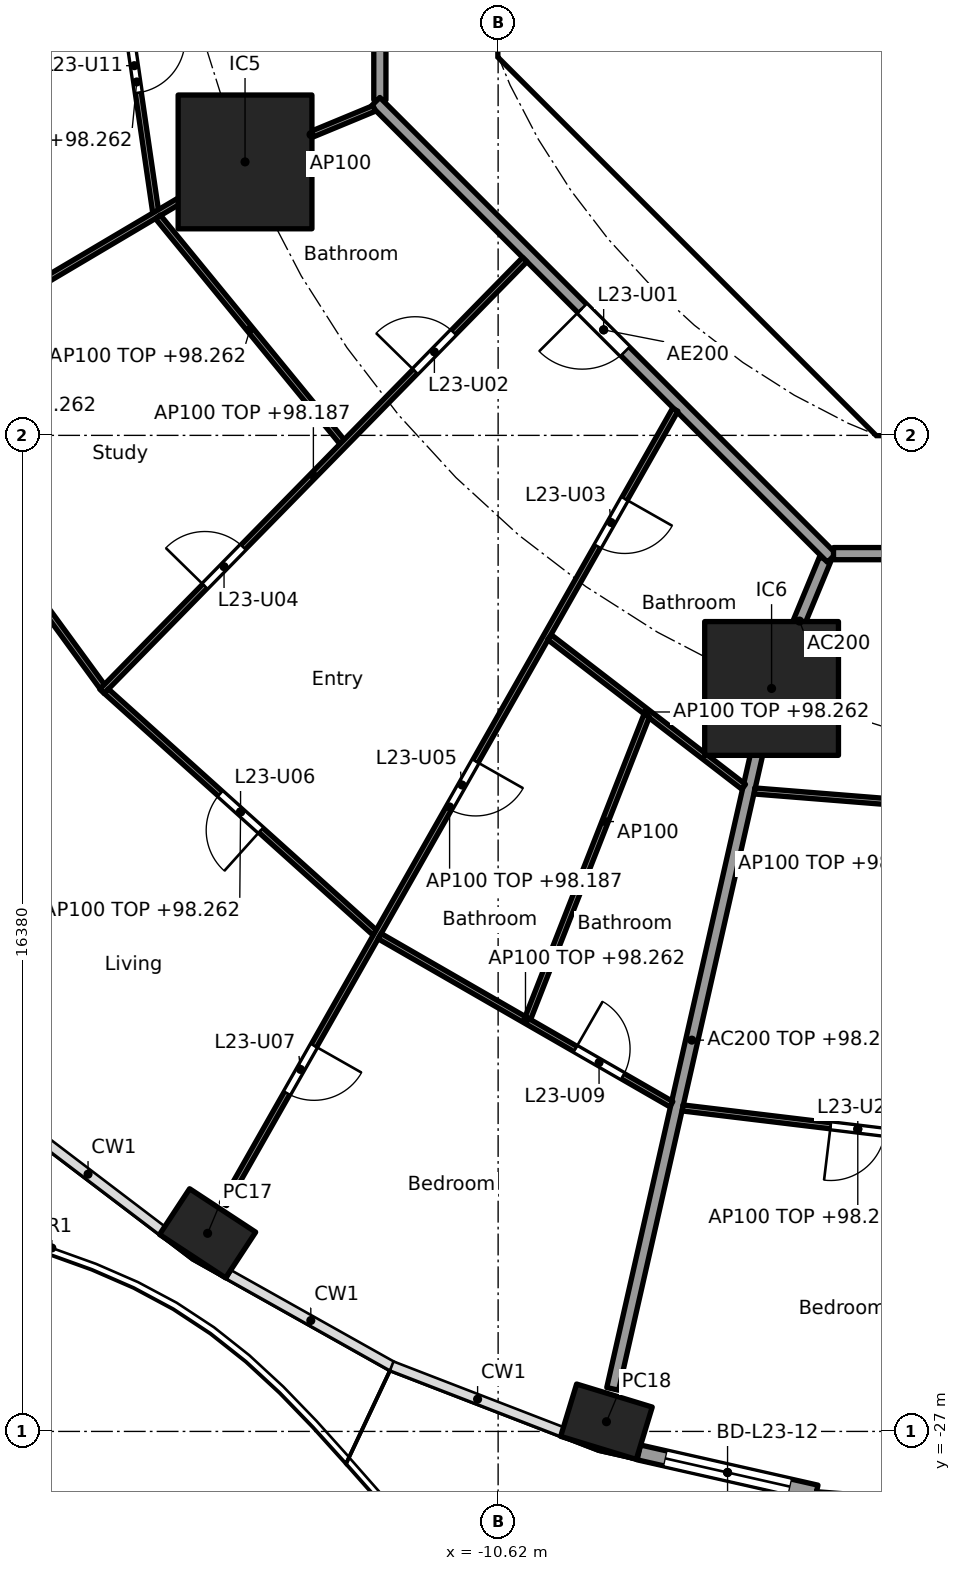
"""IFC4 building model, lengths in metres.
Left out: names, types, materials, properties, quantities, classifications, styles, units other than length and angle.
Written with IfcOpenShell. Run it as: python <this file> out.ifc"""

import sys

from ifc_helpers import new_model, si_unit, direction, frame, frame_2d, origin, origin_2d, place, context, subcontext, project, spatial, polyline, rectangle, hollow_rectangle, outline, extrude, element, fill, save


model = new_model("IFC4")
c1 = context("Model", 3, precision=1e-05, world=origin(), true_north=direction((0.0, 1.0)))
c2 = subcontext(c1, "Body", "Model", "MODEL_VIEW")
j1 = project(units=[si_unit("LENGTHUNIT", "METRE"), si_unit("PLANEANGLEUNIT", "RADIAN")], contexts=[c1])
p1 = place(None, origin())
s1 = spatial("IfcSite", under=j1, at=p1, CompositionType="ELEMENT")
p2 = place(p1, origin())
s2 = spatial("IfcBuilding", under=s1, at=p2, CompositionType="ELEMENT")
p3 = place(p2, frame((0.0, 0.0, 95.5)))
s3 = spatial("IfcBuildingStorey", under=s2, at=p3, CompositionType="ELEMENT", Elevation=95.5)
for number, where, z_axis, x_axis in (
    (1, (-15.397, -23.742, 0.0), (0.0, 0.0, 1.0), (0.836, -0.549, 0.0)),
    (2, (-8.839, -26.841, 0.0), (0.0, 0.0, 1.0), (0.957, -0.292, 0.0)),
):
    element("IfcColumn", number, at=place(p3, frame(where, z_axis=z_axis, x_axis=x_axis)), inside=s3, PredefinedType="COLUMN", context=c2, shape_type="SweptSolid", body=[
        extrude(hollow_rectangle(XDim=1.3, YDim=0.9, WallThickness=0.045, at=origin_2d()), origin(), (0.0, 0.0, 1.0), 3.7),
    ])
for number, where, z_axis, x_axis in (
    (3, (-14.782, -6.123, 0.0), (0.0, 0.0, 1.0), (1.0, 0.0, 0.0)),
    (4, (-6.123, -14.782, 0.0), (0.0, 0.0, 1.0), (1.0, 0.0, 0.0)),
):
    element("IfcColumn", number, at=place(p3, frame(where, z_axis=z_axis, x_axis=x_axis)), inside=s3, PredefinedType="COLUMN", context=c2, shape_type="SweptSolid", body=[
        extrude(rectangle(XDim=2.2, YDim=2.2, at=origin_2d()), origin(), (0.0, 0.0, 1.0), 3.7),
    ])
p4 = place(p3, frame((-5.387, -28.006, 0.0), z_axis=(0.0, 0.0, 1.0), x_axis=(-0.975317607872, 0.220806620767, 0.0)))
e5 = element("IfcWall", 5, at=p4, inside=s3, PredefinedType="SOLIDWALL", context=c2, shape_type="SweptSolid", body=[
    extrude(rectangle(XDim=2.993, YDim=0.25, at=frame_2d((1.497, 0.0))), origin(), (0.0, 0.0, 1.0), 3.44),
])
p5 = place(p4, frame((0.447, 0.0, 0.0)))
e6 = element("IfcOpeningElement", 6, at=p5, cuts=e5, PredefinedType="OPENING", context=c2, shape_type="SweptSolid", body=[
    extrude(rectangle(XDim=2.1, YDim=2.4, at=frame_2d((1.05, 1.2))), frame((0.0, 0.135, 0.0), z_axis=(0.0, -1.0, 0.0), x_axis=(1.0, 0.0, 0.0)), (0.0, 0.0, 1.0), 0.27),
])
p6 = place(p3, frame((-9.988, -4.613, 0.0), z_axis=(0.0, 0.0, 1.0), x_axis=(0.707106781187, -0.707106781187, 0.0)))
e7 = element("IfcWall", 7, at=p6, inside=s3, PredefinedType="SHEAR", context=c2, shape_type="SweptSolid", body=[
    extrude(rectangle(XDim=7.602, YDim=0.6, at=frame_2d((3.801, 0.0))), origin(), (0.0, 0.0, 1.0), 3.44),
])
p7 = place(p6, frame((6.151, 0.0, 0.0)))
e8 = element("IfcOpeningElement", 8, at=p7, cuts=e7, PredefinedType="OPENING", context=c2, shape_type="SweptSolid", body=[
    extrude(rectangle(XDim=1.1, YDim=2.1, at=frame_2d((0.55, 1.05))), frame((0.0, 0.31, 0.0), z_axis=(0.0, -1.0, 0.0), x_axis=(1.0, 0.0, 0.0)), (0.0, 0.0, 1.0), 0.62),
])
p8 = place(p3, frame((-7.4, -6.627, 0.0), z_axis=(0.0, 0.0, 1.0), x_axis=(0.0, 1.0, 0.0)))
e9 = element("IfcWall", 9, at=p8, inside=s3, PredefinedType="PARTITIONING", context=c2, shape_type="SweptSolid", body=[
    extrude(rectangle(XDim=2.527, YDim=0.15, at=frame_2d((1.263, 0.0))), origin(), (0.0, 0.0, 1.0), 3.44),
])
p9 = place(p8, frame((0.776, 0.0, 0.0)))
e10 = element("IfcOpeningElement", 10, at=p9, cuts=e9, PredefinedType="OPENING", context=c2, shape_type="SweptSolid", body=[
    extrude(rectangle(XDim=0.9, YDim=2.1, at=frame_2d((0.45, 1.05))), frame((0.0, 0.085, 0.0), z_axis=(0.0, -1.0, 0.0), x_axis=(1.0, 0.0, 0.0)), (0.0, 0.0, 1.0), 0.17),
])
p10 = place(p3, origin())
e11 = element("IfcWall", 11, at=p10, inside=s3, PredefinedType="SHEAR", context=c2, shape_type="SweptSolid", body=[
    extrude(outline(polyline([(-10.625, -3.801), (-10.025, -3.801), (-10.025, -4.152), (-9.776, -4.401), (-10.2, -4.825), (-10.625, -4.401), (-10.625, -3.801)])), origin(), (0.0, 0.0, 1.0), 3.44),
])
p11 = place(p3, origin())
e12 = element("IfcWall", 12, at=p11, inside=s3, PredefinedType="SHEAR", context=c2, shape_type="SweptSolid", body=[
    extrude(outline(polyline([(-4.152, -10.025), (4.152, -10.025), (4.401, -9.776), (4.825, -10.2), (4.401, -10.625), (-4.401, -10.625), (-4.825, -10.2), (-4.401, -9.776), (-4.152, -10.025)])), origin(), (0.0, 0.0, 1.0), 3.44),
])
p12 = place(p3, frame((-5.243, -12.657, 0.0), z_axis=(0.0, 0.0, 1.0), x_axis=(-0.382668627144, -0.923885664896, 0.0)))
e13 = element("IfcWall", 13, at=p12, inside=s3, PredefinedType="PARTITIONING", context=c2, shape_type="SweptSolid", body=[
    extrude(rectangle(XDim=2.2, YDim=0.2, at=frame_2d((1.1, 0.0))), origin(), (0.0, 0.0, 1.0), 3.44),
])
p13 = place(p3, frame((-6.134, -14.831, 0.0), z_axis=(0.0, 0.0, 1.0), x_axis=(-0.221225405869, -0.975222702667, 0.0)))
e14 = element("IfcWall", 14, at=p13, inside=s3, PredefinedType="PARTITIONING", context=c2, shape_type="SweptSolid", body=[
    extrude(rectangle(XDim=11.761, YDim=0.2, at=frame_2d((5.88, 0.0))), origin(), (0.0, 0.0, 1.0), 2.762),
])
p14 = place(p3, frame((-12.565, 5.304, 0.0), z_axis=(0.0, 0.0, 1.0), x_axis=(0.0, -1.0, 0.0)))
e15 = element("IfcWall", 15, at=p14, inside=s3, PredefinedType="PARTITIONING", context=c2, shape_type="SweptSolid", body=[
    extrude(rectangle(XDim=10.409, YDim=0.2, at=frame_2d((5.205, 0.0))), origin(), (0.0, 0.0, 1.0), 3.44),
])
p15 = place(p3, frame((-12.635, -5.134, 0.0), z_axis=(0.0, 0.0, 1.0), x_axis=(0.707106781187, -0.707106781187, 0.0)))
e16 = element("IfcWall", 16, at=p15, inside=s3, PredefinedType="PARTITIONING", context=c2, shape_type="SweptSolid", body=[
    extrude(rectangle(XDim=10.609, YDim=0.2, at=frame_2d((5.305, 0.0))), origin(), (0.0, 0.0, 1.0), 3.44),
])
p16 = place(p15, frame((4.804, 0.0, 0.0)))
e17 = element("IfcOpeningElement", 17, at=p16, cuts=e16, PredefinedType="OPENING", context=c2, shape_type="SweptSolid", body=[
    extrude(rectangle(XDim=1.0, YDim=2.1, at=frame_2d((0.5, 1.05))), frame((0.0, 0.11, 0.0), z_axis=(0.0, -1.0, 0.0), x_axis=(1.0, 0.0, 0.0)), (0.0, 0.0, 1.0), 0.22),
])
p17 = place(p3, frame((-5.104, -12.565, 0.0), z_axis=(0.0, 0.0, 1.0), x_axis=(1.0, 0.0, 0.0)))
e18 = element("IfcWall", 18, at=p17, inside=s3, PredefinedType="PARTITIONING", context=c2, shape_type="SweptSolid", body=[
    extrude(rectangle(XDim=10.409, YDim=0.2, at=frame_2d((5.205, 0.0))), origin(), (0.0, 0.0, 1.0), 3.44),
])
p18 = place(p3, frame((-16.874, -2.677, 0.0), z_axis=(0.0, 0.0, 1.0), x_axis=(0.144260658133, -0.989539722555, 0.0)))
e19 = element("IfcWall", 19, at=p18, inside=s3, PredefinedType="PARTITIONING", context=c2, shape_type="SweptSolid", body=[
    extrude(rectangle(XDim=4.309, YDim=0.1, at=frame_2d((2.154, 0.0))), origin(), (0.0, 0.0, 1.0), 2.762),
])
p19 = place(p18, frame((1.434, 0.0, 0.0)))
e20 = element("IfcOpeningElement", 20, at=p19, cuts=e19, PredefinedType="OPENING", context=c2, shape_type="SweptSolid", body=[
    extrude(rectangle(XDim=0.9, YDim=2.1, at=frame_2d((0.45, 1.05))), frame((0.0, 0.06, 0.0), z_axis=(0.0, -1.0, 0.0), x_axis=(1.0, 0.0, 0.0)), (0.0, 0.0, 1.0), 0.12),
])
p20 = place(p3, frame((-12.657, -5.243, 0.0), z_axis=(0.0, 0.0, 1.0), x_axis=(-0.923848837015, -0.382757529444, 0.0)))
e21 = element("IfcWall", 21, at=p20, inside=s3, PredefinedType="PARTITIONING", context=c2, shape_type="SweptSolid", body=[
    extrude(rectangle(XDim=2.25, YDim=0.1, at=frame_2d((1.125, 0.0))), origin(), (0.0, 0.0, 1.0), 3.44),
])
p21 = place(p3, frame((-14.825, -6.148, 0.0), z_axis=(0.0, 0.0, 1.0), x_axis=(-0.860400431487, -0.509618580408, 0.0)))
e22 = element("IfcWall", 22, at=p21, inside=s3, PredefinedType="PARTITIONING", context=c2, shape_type="SweptSolid", body=[
    extrude(rectangle(XDim=11.688, YDim=0.1, at=frame_2d((5.844, 0.0))), origin(), (0.0, 0.0, 1.0), 2.762),
])
p22 = place(p21, frame((3.858, 0.0, 0.0)))
e23 = element("IfcOpeningElement", 23, at=p22, cuts=e22, PredefinedType="OPENING", context=c2, shape_type="SweptSolid", body=[
    extrude(rectangle(XDim=0.9, YDim=2.1, at=frame_2d((0.45, 1.05))), frame((0.0, 0.06, 0.0), z_axis=(0.0, -1.0, 0.0), x_axis=(1.0, 0.0, 0.0)), (0.0, 0.0, 1.0), 0.12),
])
p23 = place(p21, frame((8.877, 0.0, 0.0)))
e24 = element("IfcOpeningElement", 24, at=p23, cuts=e22, PredefinedType="OPENING", context=c2, shape_type="SweptSolid", body=[
    extrude(rectangle(XDim=0.9, YDim=2.1, at=frame_2d((0.45, 1.05))), frame((0.0, 0.06, 0.0), z_axis=(0.0, -1.0, 0.0), x_axis=(1.0, 0.0, 0.0)), (0.0, 0.0, 1.0), 0.12),
])
p24 = place(p3, frame((-16.214, -7.028, 0.0), z_axis=(0.0, 0.0, 1.0), x_axis=(0.633396341139, -0.773827548639, 0.0)))
e25 = element("IfcWall", 25, at=p24, inside=s3, PredefinedType="PARTITIONING", context=c2, shape_type="SweptSolid", body=[
    extrude(rectangle(XDim=4.779, YDim=0.1, at=frame_2d((2.39, 0.0))), origin(), (0.0, 0.0, 1.0), 2.762),
])
p25 = place(p3, frame((-20.79, -9.739, 0.0), z_axis=(0.0, 0.0, 1.0), x_axis=(0.589611246748, -0.807687178126, 0.0)))
e26 = element("IfcWall", 26, at=p25, inside=s3, PredefinedType="PARTITIONING", context=c2, shape_type="SweptSolid", body=[
    extrude(rectangle(XDim=6.208, YDim=0.1, at=frame_2d((3.104, 0.0))), origin(), (0.0, 0.0, 1.0), 2.762),
])
p26 = place(p3, frame((-10.181, -7.729, 0.0), z_axis=(0.0, 0.0, 1.0), x_axis=(-0.699710752188, -0.714426247609, 0.0)))
e27 = element("IfcWall", 27, at=p26, inside=s3, PredefinedType="PARTITIONING", context=c2, shape_type="SweptSolid", body=[
    extrude(rectangle(XDim=9.938, YDim=0.1, at=frame_2d((4.969, 0.0))), origin(), (0.0, 0.0, 1.0), 2.687),
])
p27 = place(p26, frame((1.675, 0.0, 0.0)))
e28 = element("IfcOpeningElement", 28, at=p27, cuts=e27, PredefinedType="OPENING", context=c2, shape_type="SweptSolid", body=[
    extrude(rectangle(XDim=0.9, YDim=2.1, at=frame_2d((0.45, 1.05))), frame((0.0, 0.06, 0.0), z_axis=(0.0, -1.0, 0.0), x_axis=(1.0, 0.0, 0.0)), (0.0, 0.0, 1.0), 0.12),
])
p28 = place(p26, frame((6.619, 0.0, 0.0)))
e29 = element("IfcOpeningElement", 29, at=p28, cuts=e27, PredefinedType="OPENING", context=c2, shape_type="SweptSolid", body=[
    extrude(rectangle(XDim=0.9, YDim=2.1, at=frame_2d((0.45, 1.05))), frame((0.0, 0.06, 0.0), z_axis=(0.0, -1.0, 0.0), x_axis=(1.0, 0.0, 0.0)), (0.0, 0.0, 1.0), 0.12),
])
p29 = place(p3, frame((-17.063, -14.827, 0.0), z_axis=(0.0, 0.0, 1.0), x_axis=(0.743478142868, -0.668760234373, 0.0)))
e30 = element("IfcWall", 30, at=p29, inside=s3, PredefinedType="PARTITIONING", context=c2, shape_type="SweptSolid", body=[
    extrude(rectangle(XDim=5.937, YDim=0.1, at=frame_2d((2.969, 0.0))), origin(), (0.0, 0.0, 1.0), 2.762),
])
p30 = place(p29, frame((2.519, 0.0, 0.0)))
e31 = element("IfcOpeningElement", 31, at=p30, cuts=e30, PredefinedType="OPENING", context=c2, shape_type="SweptSolid", body=[
    extrude(rectangle(XDim=0.9, YDim=2.1, at=frame_2d((0.45, 1.05))), frame((0.0, 0.06, 0.0), z_axis=(0.0, -1.0, 0.0), x_axis=(1.0, 0.0, 0.0)), (0.0, 0.0, 1.0), 0.12),
])
p31 = place(p3, frame((-7.707, -10.198, 0.0), z_axis=(0.0, 0.0, 1.0), x_axis=(-0.49395524734, -0.869487328042, 0.0)))
e32 = element("IfcWall", 32, at=p31, inside=s3, PredefinedType="PARTITIONING", context=c2, shape_type="SweptSolid", body=[
    extrude(rectangle(XDim=15.025, YDim=0.1, at=frame_2d((7.512, 0.0))), origin(), (0.0, 0.0, 1.0), 2.687),
])
p32 = place(p31, frame((1.684, 0.0, 0.0)))
e33 = element("IfcOpeningElement", 33, at=p32, cuts=e32, PredefinedType="OPENING", context=c2, shape_type="SweptSolid", body=[
    extrude(rectangle(XDim=0.9, YDim=2.1, at=frame_2d((0.45, 1.05))), frame((0.0, 0.06, 0.0), z_axis=(0.0, -1.0, 0.0), x_axis=(1.0, 0.0, 0.0)), (0.0, 0.0, 1.0), 0.12),
])
p33 = place(p31, frame((6.648, 0.0, 0.0)))
e34 = element("IfcOpeningElement", 34, at=p33, cuts=e32, PredefinedType="OPENING", context=c2, shape_type="SweptSolid", body=[
    extrude(rectangle(XDim=0.9, YDim=2.1, at=frame_2d((0.45, 1.05))), frame((0.0, 0.06, 0.0), z_axis=(0.0, -1.0, 0.0), x_axis=(1.0, 0.0, 0.0)), (0.0, 0.0, 1.0), 0.12),
])
p34 = place(p31, frame((12.027, 0.0, 0.0)))
e35 = element("IfcOpeningElement", 35, at=p34, cuts=e32, PredefinedType="OPENING", context=c2, shape_type="SweptSolid", body=[
    extrude(rectangle(XDim=0.9, YDim=2.1, at=frame_2d((0.45, 1.05))), frame((0.0, 0.06, 0.0), z_axis=(0.0, -1.0, 0.0), x_axis=(1.0, 0.0, 0.0)), (0.0, 0.0, 1.0), 0.12),
])
p35 = place(p3, frame((-9.775, -13.939, 0.0), z_axis=(0.0, 0.0, 1.0), x_axis=(0.792162117554, -0.610310723741, 0.0)))
e36 = element("IfcWall", 36, at=p35, inside=s3, PredefinedType="PARTITIONING", context=c2, shape_type="SweptSolid", body=[
    extrude(rectangle(XDim=4.03, YDim=0.1, at=frame_2d((2.015, 0.0))), origin(), (0.0, 0.0, 1.0), 2.762),
])
p36 = place(p3, frame((-12.568, -18.856, 0.0), z_axis=(0.0, 0.0, 1.0), x_axis=(0.866533437451, -0.499119025664, 0.0)))
e37 = element("IfcWall", 37, at=p36, inside=s3, PredefinedType="PARTITIONING", context=c2, shape_type="SweptSolid", body=[
    extrude(rectangle(XDim=5.535, YDim=0.1, at=frame_2d((2.768, 0.0))), origin(), (0.0, 0.0, 1.0), 2.762),
])
p37 = place(p36, frame((3.714, 0.0, 0.0)))
e38 = element("IfcOpeningElement", 38, at=p37, cuts=e37, PredefinedType="OPENING", context=c2, shape_type="SweptSolid", body=[
    extrude(rectangle(XDim=0.9, YDim=2.1, at=frame_2d((0.45, 1.05))), frame((0.0, 0.06, 0.0), z_axis=(0.0, -1.0, 0.0), x_axis=(1.0, 0.0, 0.0)), (0.0, 0.0, 1.0), 0.12),
])
p38 = place(p3, frame((-8.177, -15.231, 0.0), z_axis=(0.0, 0.0, 1.0), x_axis=(-0.365520869553, -0.930803144559, 0.0)))
e39 = element("IfcWall", 39, at=p38, inside=s3, PredefinedType="PARTITIONING", context=c2, shape_type="SweptSolid", body=[
    extrude(rectangle(XDim=5.342, YDim=0.1, at=frame_2d((2.671, 0.0))), origin(), (0.0, 0.0, 1.0), 3.44),
])
p39 = place(p3, frame((-6.404, -16.468, 0.0), z_axis=(0.0, 0.0, 1.0), x_axis=(0.996817253426, -0.079720532316, 0.0)))
e40 = element("IfcWall", 40, at=p39, inside=s3, PredefinedType="PARTITIONING", context=c2, shape_type="SweptSolid", body=[
    extrude(rectangle(XDim=4.716, YDim=0.1, at=frame_2d((2.358, 0.0))), origin(), (0.0, 0.0, 1.0), 2.762),
])
p40 = place(p3, frame((-7.586, -21.68, 0.0), z_axis=(0.0, 0.0, 1.0), x_axis=(0.992810189026, -0.119699325668, 0.0)))
e41 = element("IfcWall", 41, at=p40, inside=s3, PredefinedType="PARTITIONING", context=c2, shape_type="SweptSolid", body=[
    extrude(rectangle(XDim=5.803, YDim=0.1, at=frame_2d((2.901, 0.0))), origin(), (0.0, 0.0, 1.0), 2.762),
])
p41 = place(p40, frame((2.451, 0.0, 0.0)))
e42 = element("IfcOpeningElement", 42, at=p41, cuts=e41, PredefinedType="OPENING", context=c2, shape_type="SweptSolid", body=[
    extrude(rectangle(XDim=0.9, YDim=2.1, at=frame_2d((0.45, 1.05))), frame((0.0, 0.06, 0.0), z_axis=(0.0, -1.0, 0.0), x_axis=(1.0, 0.0, 0.0)), (0.0, 0.0, 1.0), 0.12),
])
p42 = place(p5, origin())
e43 = element("IfcDoor", 43, at=p42, inside=s3, OperationType="SLIDING_TO_LEFT", PredefinedType="DOOR", context=c2, shape_type="SweptSolid", body=[
    extrude(rectangle(XDim=2.1, YDim=2.4, at=frame_2d((1.05, 1.2))), frame((0.0, 0.025, 0.0), z_axis=(0.0, -1.0, 0.0), x_axis=(1.0, 0.0, 0.0)), (0.0, 0.0, 1.0), 0.05),
])
fill(e6, e43)
p43 = place(p9, origin())
e44 = element("IfcDoor", 44, at=p43, inside=s3, OperationType="SINGLE_SWING_LEFT", PredefinedType="DOOR", context=c2, shape_type="SweptSolid", body=[
    extrude(rectangle(XDim=0.9, YDim=2.1, at=frame_2d((0.45, 1.05))), frame((0.0, 0.025, 0.0), z_axis=(0.0, -1.0, 0.0), x_axis=(1.0, 0.0, 0.0)), (0.0, 0.0, 1.0), 0.05),
])
fill(e10, e44)
p44 = place(p7, origin())
e45 = element("IfcDoor", 45, at=p44, inside=s3, OperationType="SINGLE_SWING_RIGHT", PredefinedType="DOOR", context=c2, shape_type="SweptSolid", body=[
    extrude(rectangle(XDim=1.1, YDim=2.1, at=frame_2d((0.55, 1.05))), frame((0.0, 0.025, 0.0), z_axis=(0.0, -1.0, 0.0), x_axis=(1.0, 0.0, 0.0)), (0.0, 0.0, 1.0), 0.05),
])
fill(e8, e45)
p45 = place(p16, frame((1.0, 0.0, 0.0), x_axis=(-1.0, 0.0, 0.0)))
e46 = element("IfcDoor", 46, at=p45, inside=s3, OperationType="SINGLE_SWING_RIGHT", PredefinedType="DOOR", context=c2, shape_type="SweptSolid", body=[
    extrude(rectangle(XDim=1.0, YDim=2.1, at=frame_2d((0.5, 1.05))), frame((0.0, 0.025, 0.0), z_axis=(0.0, -1.0, 0.0), x_axis=(1.0, 0.0, 0.0)), (0.0, 0.0, 1.0), 0.05),
])
fill(e17, e46)
p46 = place(p27, frame((0.9, 0.0, 0.0), x_axis=(-1.0, 0.0, 0.0)))
e47 = element("IfcDoor", 47, at=p46, inside=s3, OperationType="SINGLE_SWING_LEFT", PredefinedType="DOOR", context=c2, shape_type="SweptSolid", body=[
    extrude(rectangle(XDim=0.9, YDim=2.1, at=frame_2d((0.45, 1.05))), frame((0.0, 0.025, 0.0), z_axis=(0.0, -1.0, 0.0), x_axis=(1.0, 0.0, 0.0)), (0.0, 0.0, 1.0), 0.05),
])
fill(e28, e47)
p47 = place(p32, origin())
e48 = element("IfcDoor", 48, at=p47, inside=s3, OperationType="SINGLE_SWING_LEFT", PredefinedType="DOOR", context=c2, shape_type="SweptSolid", body=[
    extrude(rectangle(XDim=0.9, YDim=2.1, at=frame_2d((0.45, 1.05))), frame((0.0, 0.025, 0.0), z_axis=(0.0, -1.0, 0.0), x_axis=(1.0, 0.0, 0.0)), (0.0, 0.0, 1.0), 0.05),
])
fill(e33, e48)
p48 = place(p28, frame((0.9, 0.0, 0.0), x_axis=(-1.0, 0.0, 0.0)))
e49 = element("IfcDoor", 49, at=p48, inside=s3, OperationType="SINGLE_SWING_LEFT", PredefinedType="DOOR", context=c2, shape_type="SweptSolid", body=[
    extrude(rectangle(XDim=0.9, YDim=2.1, at=frame_2d((0.45, 1.05))), frame((0.0, 0.025, 0.0), z_axis=(0.0, -1.0, 0.0), x_axis=(1.0, 0.0, 0.0)), (0.0, 0.0, 1.0), 0.05),
])
fill(e29, e49)
p49 = place(p33, origin())
e50 = element("IfcDoor", 50, at=p49, inside=s3, OperationType="SINGLE_SWING_LEFT", PredefinedType="DOOR", context=c2, shape_type="SweptSolid", body=[
    extrude(rectangle(XDim=0.9, YDim=2.1, at=frame_2d((0.45, 1.05))), frame((0.0, 0.025, 0.0), z_axis=(0.0, -1.0, 0.0), x_axis=(1.0, 0.0, 0.0)), (0.0, 0.0, 1.0), 0.05),
])
fill(e34, e50)
p50 = place(p30, frame((0.9, 0.0, 0.0), x_axis=(-1.0, 0.0, 0.0)))
e51 = element("IfcDoor", 51, at=p50, inside=s3, OperationType="SINGLE_SWING_LEFT", PredefinedType="DOOR", context=c2, shape_type="SweptSolid", body=[
    extrude(rectangle(XDim=0.9, YDim=2.1, at=frame_2d((0.45, 1.05))), frame((0.0, 0.025, 0.0), z_axis=(0.0, -1.0, 0.0), x_axis=(1.0, 0.0, 0.0)), (0.0, 0.0, 1.0), 0.05),
])
fill(e31, e51)
p51 = place(p34, origin())
e52 = element("IfcDoor", 52, at=p51, inside=s3, OperationType="SINGLE_SWING_LEFT", PredefinedType="DOOR", context=c2, shape_type="SweptSolid", body=[
    extrude(rectangle(XDim=0.9, YDim=2.1, at=frame_2d((0.45, 1.05))), frame((0.0, 0.025, 0.0), z_axis=(0.0, -1.0, 0.0), x_axis=(1.0, 0.0, 0.0)), (0.0, 0.0, 1.0), 0.05),
])
fill(e35, e52)
p52 = place(p37, origin())
e53 = element("IfcDoor", 53, at=p52, inside=s3, OperationType="SINGLE_SWING_LEFT", PredefinedType="DOOR", context=c2, shape_type="SweptSolid", body=[
    extrude(rectangle(XDim=0.9, YDim=2.1, at=frame_2d((0.45, 1.05))), frame((0.0, 0.025, 0.0), z_axis=(0.0, -1.0, 0.0), x_axis=(1.0, 0.0, 0.0)), (0.0, 0.0, 1.0), 0.05),
])
fill(e38, e53)
p53 = place(p19, origin())
e54 = element("IfcDoor", 54, at=p53, inside=s3, OperationType="SINGLE_SWING_LEFT", PredefinedType="DOOR", context=c2, shape_type="SweptSolid", body=[
    extrude(rectangle(XDim=0.9, YDim=2.1, at=frame_2d((0.45, 1.05))), frame((0.0, 0.025, 0.0), z_axis=(0.0, -1.0, 0.0), x_axis=(1.0, 0.0, 0.0)), (0.0, 0.0, 1.0), 0.05),
])
fill(e20, e54)
p54 = place(p41, frame((0.9, 0.0, 0.0), x_axis=(-1.0, 0.0, 0.0)))
e55 = element("IfcDoor", 55, at=p54, inside=s3, OperationType="SINGLE_SWING_RIGHT", PredefinedType="DOOR", context=c2, shape_type="SweptSolid", body=[
    extrude(rectangle(XDim=0.9, YDim=2.1, at=frame_2d((0.45, 1.05))), frame((0.0, 0.025, 0.0), z_axis=(0.0, -1.0, 0.0), x_axis=(1.0, 0.0, 0.0)), (0.0, 0.0, 1.0), 0.05),
])
fill(e42, e55)
save(model, sys.argv[1])
